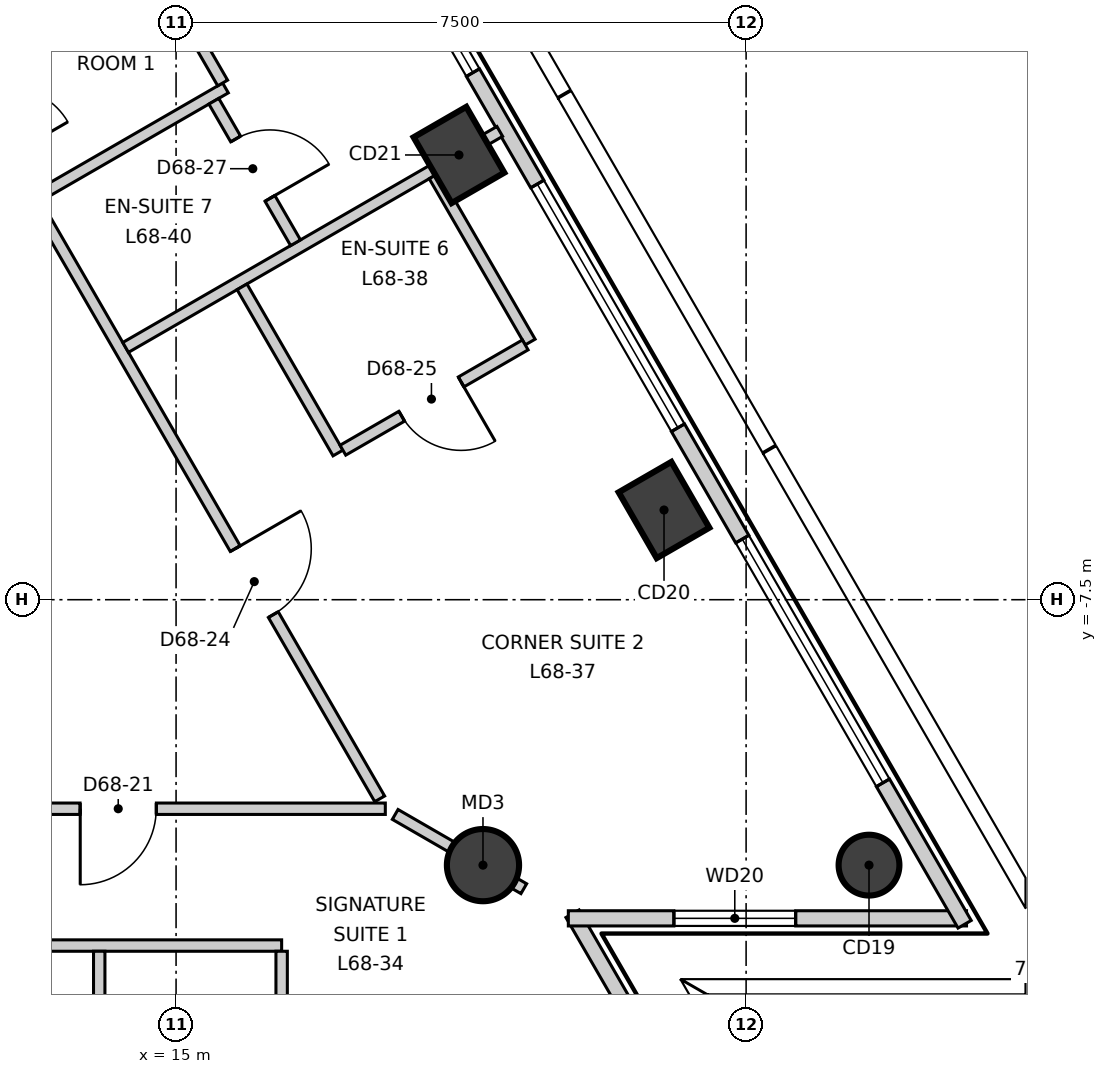
"""IFC4 building model, lengths in metres.
Left out: names, types, materials, properties, quantities, classifications, styles, units other than length and angle.
Written with IfcOpenShell. Run it as: python <this file> out.ifc"""

import sys

from ifc_helpers import new_model, si_unit, direction, frame, frame_2d, origin, origin_2d, place, context, subcontext, project, spatial, rectangle, circle, extrude, element, fill, save


model = new_model("IFC4")
c1 = context("Model", 3, precision=1e-05, world=origin(), true_north=direction((0.0, 1.0)))
c2 = subcontext(c1, "Body", "Model", "MODEL_VIEW")
j1 = project(units=[si_unit("LENGTHUNIT", "METRE"), si_unit("PLANEANGLEUNIT", "RADIAN")], contexts=[c1])
p1 = place(None, origin())
s1 = spatial("IfcSite", under=j1, at=p1, CompositionType="ELEMENT")
p2 = place(p1, origin())
s2 = spatial("IfcBuilding", under=s1, at=p2, CompositionType="ELEMENT")
p3 = place(p2, frame((0.0, 0.0, 289.9)))
s3 = spatial("IfcBuildingStorey", under=s2, at=p3, CompositionType="ELEMENT", Elevation=289.9)
p4 = place(p3, frame((24.117, -10.992, -0.3), z_axis=(0.0, 0.0, 1.0), x_axis=(-0.5, 0.866025403784, 0.0)))
e1 = element("IfcColumn", 1, at=p4, inside=s3, PredefinedType="COLUMN", context=c2, shape_type="SweptSolid", body=[
    extrude(circle(Radius=0.4, at=origin_2d()), origin(), (0.0, 0.0, 1.0), 3.6),
])
for number, where, z_axis, x_axis in (
    (2, (21.42, -6.32, -0.3), (0.0, 0.0, 1.0), (-0.5, 0.866, 0.0)),
    (3, (18.722, -1.649, -0.3), (0.0, 0.0, 1.0), (-0.5, 0.866, 0.0)),
):
    element("IfcColumn", number, at=place(p3, frame(where, z_axis=z_axis, x_axis=x_axis)), inside=s3, PredefinedType="COLUMN", context=c2, shape_type="SweptSolid", body=[
        extrude(rectangle(XDim=1.0, YDim=0.8, at=origin_2d()), origin(), (0.0, 0.0, 1.0), 3.6),
    ])
p5 = place(p3, frame((19.038, -10.992, -0.3), z_axis=(0.0, 0.0, 1.0), x_axis=(1.0, 0.0, 0.0)))
e4 = element("IfcColumn", 4, at=p5, inside=s3, PredefinedType="COLUMN", context=c2, shape_type="SweptSolid", body=[
    extrude(circle(Radius=0.475, at=origin_2d()), origin(), (0.0, 0.0, 1.0), 3.6),
])
p6 = place(p3, frame((22.835, -16.168, 0.0), z_axis=(0.0, 0.0, 1.0), x_axis=(-0.499933584342, 0.866063745487, 0.0)))
e5 = element("IfcWall", 5, at=p6, inside=s3, PredefinedType="ELEMENTEDWALL", context=c2, shape_type="SweptSolid", body=[
    extrude(rectangle(XDim=5.239, YDim=0.2, at=frame_2d((2.619, 0.0))), origin(), (0.0, 0.0, 1.0), 3.3),
])
p7 = place(p6, frame((1.99, 0.0, 0.9)))
e6 = element("IfcOpeningElement", 6, at=p7, cuts=e5, PredefinedType="OPENING", context=c2, shape_type="SweptSolid", body=[
    extrude(rectangle(XDim=1.6, YDim=2.2, at=frame_2d((0.8, 1.1))), frame((0.0, 0.11, 0.0), z_axis=(0.0, -1.0, 0.0), x_axis=(1.0, 0.0, 0.0)), (0.0, 0.0, 1.0), 0.22),
])
p8 = place(p3, frame((20.161, -11.692, 0.0), z_axis=(0.0, 0.0, 1.0), x_axis=(1.0, 0.0, 0.0)))
e7 = element("IfcWall", 7, at=p8, inside=s3, PredefinedType="ELEMENTEDWALL", context=c2, shape_type="SweptSolid", body=[
    extrude(rectangle(XDim=5.239, YDim=0.2, at=frame_2d((2.62, 0.0))), origin(), (0.0, 0.0, 1.0), 3.3),
])
p9 = place(p8, frame((1.39, 0.0, 0.9)))
e8 = element("IfcOpeningElement", 8, at=p9, cuts=e7, PredefinedType="OPENING", context=c2, shape_type="SweptSolid", body=[
    extrude(rectangle(XDim=1.6, YDim=2.2, at=frame_2d((0.8, 1.1))), frame((0.0, 0.11, 0.0), z_axis=(0.0, -1.0, 0.0), x_axis=(1.0, 0.0, 0.0)), (0.0, 0.0, 1.0), 0.22),
])
p10 = place(p3, frame((25.375, -11.77, 0.0), z_axis=(0.0, 0.0, 1.0), x_axis=(-0.500008134474, 0.866020707292, 0.0)))
e9 = element("IfcWall", 9, at=p10, inside=s3, PredefinedType="ELEMENTEDWALL", context=c2, shape_type="SweptSolid", body=[
    extrude(rectangle(XDim=45.741, YDim=0.2, at=frame_2d((22.871, 0.0))), origin(), (0.0, 0.0, 1.0), 3.3),
])
p11 = place(p10, frame((2.15, 0.0, 0.9)))
e10 = element("IfcOpeningElement", 10, at=p11, cuts=e9, PredefinedType="OPENING", context=c2, shape_type="SweptSolid", body=[
    extrude(rectangle(XDim=3.7, YDim=2.2, at=frame_2d((1.85, 1.1))), frame((0.0, 0.11, 0.0), z_axis=(0.0, -1.0, 0.0), x_axis=(1.0, 0.0, 0.0)), (0.0, 0.0, 1.0), 0.22),
])
p12 = place(p10, frame((7.544, 0.0, 0.9)))
e11 = element("IfcOpeningElement", 11, at=p12, cuts=e9, PredefinedType="OPENING", context=c2, shape_type="SweptSolid", body=[
    extrude(rectangle(XDim=3.7, YDim=2.2, at=frame_2d((1.85, 1.1))), frame((0.0, 0.11, 0.0), z_axis=(0.0, -1.0, 0.0), x_axis=(1.0, 0.0, 0.0)), (0.0, 0.0, 1.0), 0.22),
])
p13 = place(p10, frame((12.939, 0.0, 0.9)))
e12 = element("IfcOpeningElement", 12, at=p13, cuts=e9, PredefinedType="OPENING", context=c2, shape_type="SweptSolid", body=[
    extrude(rectangle(XDim=3.7, YDim=2.2, at=frame_2d((1.85, 1.1))), frame((0.0, 0.11, 0.0), z_axis=(0.0, -1.0, 0.0), x_axis=(1.0, 0.0, 0.0)), (0.0, 0.0, 1.0), 0.22),
])
p14 = place(p10, frame((18.333, 0.0, 0.9)))
e13 = element("IfcOpeningElement", 13, at=p14, cuts=e9, PredefinedType="OPENING", context=c2, shape_type="SweptSolid", body=[
    extrude(rectangle(XDim=3.7, YDim=2.2, at=frame_2d((1.85, 1.1))), frame((0.0, 0.11, 0.0), z_axis=(0.0, -1.0, 0.0), x_axis=(1.0, 0.0, 0.0)), (0.0, 0.0, 1.0), 0.22),
])
p15 = place(p10, frame((23.728, 0.0, 0.9)))
e14 = element("IfcOpeningElement", 14, at=p15, cuts=e9, PredefinedType="OPENING", context=c2, shape_type="SweptSolid", body=[
    extrude(rectangle(XDim=3.7, YDim=2.2, at=frame_2d((1.85, 1.1))), frame((0.0, 0.11, 0.0), z_axis=(0.0, -1.0, 0.0), x_axis=(1.0, 0.0, 0.0)), (0.0, 0.0, 1.0), 0.22),
])
p16 = place(p10, frame((29.122, 0.0, 0.9)))
e15 = element("IfcOpeningElement", 15, at=p16, cuts=e9, PredefinedType="OPENING", context=c2, shape_type="SweptSolid", body=[
    extrude(rectangle(XDim=3.7, YDim=2.2, at=frame_2d((1.85, 1.1))), frame((0.0, 0.11, 0.0), z_axis=(0.0, -1.0, 0.0), x_axis=(1.0, 0.0, 0.0)), (0.0, 0.0, 1.0), 0.22),
])
p17 = place(p10, frame((34.517, 0.0, 0.9)))
e16 = element("IfcOpeningElement", 16, at=p17, cuts=e9, PredefinedType="OPENING", context=c2, shape_type="SweptSolid", body=[
    extrude(rectangle(XDim=3.7, YDim=2.2, at=frame_2d((1.85, 1.1))), frame((0.0, 0.11, 0.0), z_axis=(0.0, -1.0, 0.0), x_axis=(1.0, 0.0, 0.0)), (0.0, 0.0, 1.0), 0.22),
])
p18 = place(p10, frame((39.911, 0.0, 0.9)))
e17 = element("IfcOpeningElement", 17, at=p18, cuts=e9, PredefinedType="OPENING", context=c2, shape_type="SweptSolid", body=[
    extrude(rectangle(XDim=3.7, YDim=2.2, at=frame_2d((1.85, 1.1))), frame((0.0, 0.11, 0.0), z_axis=(0.0, -1.0, 0.0), x_axis=(1.0, 0.0, 0.0)), (0.0, 0.0, 1.0), 0.22),
])
p19 = place(p3, frame((-17.603, -10.25, 0.0), z_axis=(0.0, 0.0, 1.0), x_axis=(1.0, 0.0, 0.0)))
e18 = element("IfcWall", 18, at=p19, inside=s3, PredefinedType="PARTITIONING", context=c2, shape_type="SweptSolid", body=[
    extrude(rectangle(XDim=35.356, YDim=0.15, at=frame_2d((17.678, 0.0))), origin(), (0.0, 0.0, 1.0), 3.3),
])
p20 = place(p19, frame((2.8, 0.0, 0.0)))
e19 = element("IfcOpeningElement", 19, at=p20, cuts=e18, PredefinedType="OPENING", context=c2, shape_type="SweptSolid", body=[
    extrude(rectangle(XDim=1.0, YDim=2.1, at=frame_2d((0.5, 1.05))), frame((0.0, 0.085, 0.0), z_axis=(0.0, -1.0, 0.0), x_axis=(1.0, 0.0, 0.0)), (0.0, 0.0, 1.0), 0.17),
])
p21 = place(p19, frame((15.065, 0.0, 0.0)))
e20 = element("IfcOpeningElement", 20, at=p21, cuts=e18, PredefinedType="OPENING", context=c2, shape_type="SweptSolid", body=[
    extrude(rectangle(XDim=1.0, YDim=2.1, at=frame_2d((0.5, 1.05))), frame((0.0, 0.085, 0.0), z_axis=(0.0, -1.0, 0.0), x_axis=(1.0, 0.0, 0.0)), (0.0, 0.0, 1.0), 0.17),
])
p22 = place(p19, frame((9.765, 0.0, 0.0)))
e21 = element("IfcOpeningElement", 21, at=p22, cuts=e18, PredefinedType="OPENING", context=c2, shape_type="SweptSolid", body=[
    extrude(rectangle(XDim=0.9, YDim=2.1, at=frame_2d((0.45, 1.05))), frame((0.0, 0.085, 0.0), z_axis=(0.0, -1.0, 0.0), x_axis=(1.0, 0.0, 0.0)), (0.0, 0.0, 1.0), 0.17),
])
p23 = place(p19, frame((11.965, 0.0, 0.0)))
e22 = element("IfcOpeningElement", 22, at=p23, cuts=e18, PredefinedType="OPENING", context=c2, shape_type="SweptSolid", body=[
    extrude(rectangle(XDim=0.9, YDim=2.1, at=frame_2d((0.45, 1.05))), frame((0.0, 0.085, 0.0), z_axis=(0.0, -1.0, 0.0), x_axis=(1.0, 0.0, 0.0)), (0.0, 0.0, 1.0), 0.17),
])
p24 = place(p19, frame((20.953, 0.0, 0.0)))
e23 = element("IfcOpeningElement", 23, at=p24, cuts=e18, PredefinedType="OPENING", context=c2, shape_type="SweptSolid", body=[
    extrude(rectangle(XDim=1.0, YDim=2.1, at=frame_2d((0.5, 1.05))), frame((0.0, 0.085, 0.0), z_axis=(0.0, -1.0, 0.0), x_axis=(1.0, 0.0, 0.0)), (0.0, 0.0, 1.0), 0.17),
])
p25 = place(p19, frame((26.347, 0.0, 0.0)))
e24 = element("IfcOpeningElement", 24, at=p25, cuts=e18, PredefinedType="OPENING", context=c2, shape_type="SweptSolid", body=[
    extrude(rectangle(XDim=1.0, YDim=2.1, at=frame_2d((0.5, 1.05))), frame((0.0, 0.085, 0.0), z_axis=(0.0, -1.0, 0.0), x_axis=(1.0, 0.0, 0.0)), (0.0, 0.0, 1.0), 0.17),
])
p26 = place(p19, frame((31.342, 0.0, 0.0)))
e25 = element("IfcOpeningElement", 25, at=p26, cuts=e18, PredefinedType="OPENING", context=c2, shape_type="SweptSolid", body=[
    extrude(rectangle(XDim=1.0, YDim=2.1, at=frame_2d((0.5, 1.05))), frame((0.0, 0.085, 0.0), z_axis=(0.0, -1.0, 0.0), x_axis=(1.0, 0.0, 0.0)), (0.0, 0.0, 1.0), 0.17),
])
p27 = place(p3, frame((17.883, -10.325, 0.0), z_axis=(0.0, 0.0, 1.0), x_axis=(0.865973311606, -0.500090215447, 0.0)))
e26 = element("IfcWall", 26, at=p27, inside=s3, PredefinedType="PARTITIONING", context=c2, shape_type="SweptSolid", body=[
    extrude(rectangle(XDim=1.954, YDim=0.15, at=frame_2d((0.977, 0.0))), origin(), (0.0, 0.0, 1.0), 2.8),
])
p28 = place(p3, frame((0.075, 20.37, 0.0), z_axis=(0.0, 0.0, 1.0), x_axis=(0.500009775255, -0.866019759965, 0.0)))
e27 = element("IfcWall", 27, at=p28, inside=s3, PredefinedType="PARTITIONING", context=c2, shape_type="SweptSolid", body=[
    extrude(rectangle(XDim=35.207, YDim=0.15, at=frame_2d((17.604, 0.0))), origin(), (0.0, 0.0, 1.0), 3.3),
])
p29 = place(p28, frame((31.407, 0.0, 0.0)))
e28 = element("IfcOpeningElement", 28, at=p29, cuts=e27, PredefinedType="OPENING", context=c2, shape_type="SweptSolid", body=[
    extrude(rectangle(XDim=1.0, YDim=2.1, at=frame_2d((0.5, 1.05))), frame((0.0, 0.085, 0.0), z_axis=(0.0, -1.0, 0.0), x_axis=(1.0, 0.0, 0.0)), (0.0, 0.0, 1.0), 0.17),
])
p30 = place(p28, frame((19.243, 0.0, 0.0)))
e29 = element("IfcOpeningElement", 29, at=p30, cuts=e27, PredefinedType="OPENING", context=c2, shape_type="SweptSolid", body=[
    extrude(rectangle(XDim=1.0, YDim=2.1, at=frame_2d((0.5, 1.05))), frame((0.0, 0.085, 0.0), z_axis=(0.0, -1.0, 0.0), x_axis=(1.0, 0.0, 0.0)), (0.0, 0.0, 1.0), 0.17),
])
p31 = place(p28, frame((24.543, 0.0, 0.0)))
e30 = element("IfcOpeningElement", 30, at=p31, cuts=e27, PredefinedType="OPENING", context=c2, shape_type="SweptSolid", body=[
    extrude(rectangle(XDim=0.9, YDim=2.1, at=frame_2d((0.45, 1.05))), frame((0.0, 0.085, 0.0), z_axis=(0.0, -1.0, 0.0), x_axis=(1.0, 0.0, 0.0)), (0.0, 0.0, 1.0), 0.17),
])
p32 = place(p28, frame((22.443, 0.0, 0.0)))
e31 = element("IfcOpeningElement", 31, at=p32, cuts=e27, PredefinedType="OPENING", context=c2, shape_type="SweptSolid", body=[
    extrude(rectangle(XDim=0.9, YDim=2.1, at=frame_2d((0.45, 1.05))), frame((0.0, 0.085, 0.0), z_axis=(0.0, -1.0, 0.0), x_axis=(1.0, 0.0, 0.0)), (0.0, 0.0, 1.0), 0.17),
])
p33 = place(p28, frame((13.253, 0.0, 0.0)))
e32 = element("IfcOpeningElement", 32, at=p33, cuts=e27, PredefinedType="OPENING", context=c2, shape_type="SweptSolid", body=[
    extrude(rectangle(XDim=1.0, YDim=2.1, at=frame_2d((0.5, 1.05))), frame((0.0, 0.085, 0.0), z_axis=(0.0, -1.0, 0.0), x_axis=(1.0, 0.0, 0.0)), (0.0, 0.0, 1.0), 0.17),
])
p34 = place(p28, frame((5.559, 0.0, 0.0)))
e33 = element("IfcOpeningElement", 33, at=p34, cuts=e27, PredefinedType="OPENING", context=c2, shape_type="SweptSolid", body=[
    extrude(rectangle(XDim=1.0, YDim=2.1, at=frame_2d((0.5, 1.05))), frame((0.0, 0.085, 0.0), z_axis=(0.0, -1.0, 0.0), x_axis=(1.0, 0.0, 0.0)), (0.0, 0.0, 1.0), 0.17),
])
p35 = place(p3, frame((12.086, -0.284, 0.0), z_axis=(0.0, 0.0, 1.0), x_axis=(0.865995540999, 0.500051720295, 0.0)))
e34 = element("IfcWall", 34, at=p35, inside=s3, PredefinedType="PARTITIONING", context=c2, shape_type="SweptSolid", body=[
    extrude(rectangle(XDim=2.845, YDim=0.15, at=frame_2d((1.423, 0.0))), origin(), (0.0, 0.0, 1.0), 3.3),
])
p36 = place(p3, frame((13.186, -2.189, 0.0), z_axis=(0.0, 0.0, 1.0), x_axis=(0.866122712398, 0.499831418649, 0.0)))
e35 = element("IfcWall", 35, at=p36, inside=s3, PredefinedType="PARTITIONING", context=c2, shape_type="SweptSolid", body=[
    extrude(rectangle(XDim=2.845, YDim=0.15, at=frame_2d((1.422, 0.0))), origin(), (0.0, 0.0, 1.0), 3.3),
])
p37 = place(p3, frame((14.336, -4.181, 0.0), z_axis=(0.0, 0.0, 1.0), x_axis=(0.86606758311, 0.499926936147, 0.0)))
e36 = element("IfcWall", 36, at=p37, inside=s3, PredefinedType="PARTITIONING", context=c2, shape_type="SweptSolid", body=[
    extrude(rectangle(XDim=5.684, YDim=0.15, at=frame_2d((2.842, 0.0))), origin(), (0.0, 0.0, 1.0), 3.3),
])
p38 = place(p3, frame((14.588, 1.074, 0.0), z_axis=(0.0, 0.0, 1.0), x_axis=(0.499942325911, -0.866058699375, 0.0)))
e37 = element("IfcWall", 37, at=p38, inside=s3, PredefinedType="PARTITIONING", context=c2, shape_type="SweptSolid", body=[
    extrude(rectangle(XDim=2.051, YDim=0.15, at=frame_2d((1.025, 0.0))), origin(), (0.0, 0.0, 1.0), 3.3),
])
p39 = place(p3, frame((10.864, -12.05, 0.0), z_axis=(0.0, 0.0, 1.0), x_axis=(1.0, 0.0, 0.0)))
e38 = element("IfcWall", 38, at=p39, inside=s3, PredefinedType="PARTITIONING", context=c2, shape_type="SweptSolid", body=[
    extrude(rectangle(XDim=5.525, YDim=0.15, at=frame_2d((2.762, 0.0))), origin(), (0.0, 0.0, 1.0), 3.3),
])
p40 = place(p39, frame((1.075, 0.0, 0.0)))
e39 = element("IfcOpeningElement", 39, at=p40, cuts=e38, PredefinedType="OPENING", context=c2, shape_type="SweptSolid", body=[
    extrude(rectangle(XDim=0.9, YDim=2.1, at=frame_2d((0.45, 1.05))), frame((0.0, 0.085, 0.0), z_axis=(0.0, -1.0, 0.0), x_axis=(1.0, 0.0, 0.0)), (0.0, 0.0, 1.0), 0.17),
])
p41 = place(p3, frame((15.497, -0.942, 0.0), z_axis=(0.0, 0.0, 1.0), x_axis=(0.499961633463, -0.866047553582, 0.0)))
e40 = element("IfcWall", 40, at=p41, inside=s3, PredefinedType="PARTITIONING", context=c2, shape_type="SweptSolid", body=[
    extrude(rectangle(XDim=2.15, YDim=0.15, at=frame_2d((1.075, 0.0))), origin(), (0.0, 0.0, 1.0), 3.3),
])
p42 = place(p41, frame((0.575, 0.0, 0.0)))
e41 = element("IfcOpeningElement", 41, at=p42, cuts=e40, PredefinedType="OPENING", context=c2, shape_type="SweptSolid", body=[
    extrude(rectangle(XDim=0.9, YDim=2.1, at=frame_2d((0.45, 1.05))), frame((0.0, 0.085, 0.0), z_axis=(0.0, -1.0, 0.0), x_axis=(1.0, 0.0, 0.0)), (0.0, 0.0, 1.0), 0.17),
])
p43 = place(p3, frame((18.396, -1.924, 0.0), z_axis=(0.0, 0.0, 1.0), x_axis=(0.500246986138, -0.865882759304, 0.0)))
e42 = element("IfcWall", 42, at=p43, inside=s3, PredefinedType="PARTITIONING", context=c2, shape_type="SweptSolid", body=[
    extrude(rectangle(XDim=2.525, YDim=0.15, at=frame_2d((1.262, 0.0))), origin(), (0.0, 0.0, 1.0), 2.6),
])
p44 = place(p3, frame((15.868, -3.384, 0.0), z_axis=(0.0, 0.0, 1.0), x_axis=(0.499956887143, -0.866050293573, 0.0)))
e43 = element("IfcWall", 43, at=p44, inside=s3, PredefinedType="PARTITIONING", context=c2, shape_type="SweptSolid", body=[
    extrude(rectangle(XDim=2.524, YDim=0.15, at=frame_2d((1.262, 0.0))), origin(), (0.0, 0.0, 1.0), 3.3),
])
p45 = place(p3, frame((13.989, -14.895, 0.0), z_axis=(0.0, 0.0, 1.0), x_axis=(0.0, 1.0, 0.0)))
e44 = element("IfcWall", 44, at=p45, inside=s3, PredefinedType="PARTITIONING", context=c2, shape_type="SweptSolid", body=[
    extrude(rectangle(XDim=2.77, YDim=0.15, at=frame_2d((1.385, 0.0))), origin(), (0.0, 0.0, 1.0), 3.3),
])
p46 = place(p3, frame((16.389, -14.775, 0.0), z_axis=(0.0, 0.0, 1.0), x_axis=(0.0, 1.0, 0.0)))
e45 = element("IfcWall", 45, at=p46, inside=s3, PredefinedType="PARTITIONING", context=c2, shape_type="SweptSolid", body=[
    extrude(rectangle(XDim=2.65, YDim=0.15, at=frame_2d((1.325, 0.0))), origin(), (0.0, 0.0, 1.0), 3.3),
])
p47 = place(p46, frame((0.875, 0.0, 0.0)))
e46 = element("IfcOpeningElement", 46, at=p47, cuts=e45, PredefinedType="OPENING", context=c2, shape_type="SweptSolid", body=[
    extrude(rectangle(XDim=0.9, YDim=2.1, at=frame_2d((0.45, 1.05))), frame((0.0, 0.085, 0.0), z_axis=(0.0, -1.0, 0.0), x_axis=(1.0, 0.0, 0.0)), (0.0, 0.0, 1.0), 0.17),
])
p48 = place(p3, frame((17.195, -5.533, 0.0), z_axis=(0.0, 0.0, 1.0), x_axis=(0.866027073272, 0.499997108352, 0.0)))
e47 = element("IfcWall", 47, at=p48, inside=s3, PredefinedType="PARTITIONING", context=c2, shape_type="SweptSolid", body=[
    extrude(rectangle(XDim=2.77, YDim=0.15, at=frame_2d((1.385, 0.0))), origin(), (0.0, 0.0, 1.0), 3.3),
])
p49 = place(p48, frame((0.895, 0.0, 0.0)))
e48 = element("IfcOpeningElement", 48, at=p49, cuts=e47, PredefinedType="OPENING", context=c2, shape_type="SweptSolid", body=[
    extrude(rectangle(XDim=0.9, YDim=2.1, at=frame_2d((0.45, 1.05))), frame((0.0, 0.085, 0.0), z_axis=(0.0, -1.0, 0.0), x_axis=(1.0, 0.0, 0.0)), (0.0, 0.0, 1.0), 0.17),
])
p50 = place(p9, origin())
e49 = element("IfcWindow", 49, at=p50, inside=s3, PartitioningType="SINGLE_PANEL", PredefinedType="WINDOW", context=c2, shape_type="SweptSolid", body=[
    extrude(rectangle(XDim=1.6, YDim=2.2, at=frame_2d((0.8, 1.1))), frame((0.0, 0.03, 0.0), z_axis=(0.0, -1.0, 0.0), x_axis=(1.0, 0.0, 0.0)), (0.0, 0.0, 1.0), 0.06),
])
fill(e8, e49)
p51 = place(p11, origin())
e50 = element("IfcWindow", 50, at=p51, inside=s3, PartitioningType="SINGLE_PANEL", PredefinedType="WINDOW", context=c2, shape_type="SweptSolid", body=[
    extrude(rectangle(XDim=3.7, YDim=2.2, at=frame_2d((1.85, 1.1))), frame((0.0, 0.03, 0.0), z_axis=(0.0, -1.0, 0.0), x_axis=(1.0, 0.0, 0.0)), (0.0, 0.0, 1.0), 0.06),
])
fill(e10, e50)
p52 = place(p12, origin())
e51 = element("IfcWindow", 51, at=p52, inside=s3, PartitioningType="SINGLE_PANEL", PredefinedType="WINDOW", context=c2, shape_type="SweptSolid", body=[
    extrude(rectangle(XDim=3.7, YDim=2.2, at=frame_2d((1.85, 1.1))), frame((0.0, 0.03, 0.0), z_axis=(0.0, -1.0, 0.0), x_axis=(1.0, 0.0, 0.0)), (0.0, 0.0, 1.0), 0.06),
])
fill(e11, e51)
p53 = place(p13, origin())
e52 = element("IfcWindow", 52, at=p53, inside=s3, PartitioningType="SINGLE_PANEL", PredefinedType="WINDOW", context=c2, shape_type="SweptSolid", body=[
    extrude(rectangle(XDim=3.7, YDim=2.2, at=frame_2d((1.85, 1.1))), frame((0.0, 0.03, 0.0), z_axis=(0.0, -1.0, 0.0), x_axis=(1.0, 0.0, 0.0)), (0.0, 0.0, 1.0), 0.06),
])
fill(e12, e52)
p54 = place(p26, origin())
e53 = element("IfcDoor", 53, at=p54, inside=s3, OperationType="SINGLE_SWING_LEFT", PredefinedType="DOOR", context=c2, shape_type="SweptSolid", body=[
    extrude(rectangle(XDim=1.0, YDim=2.1, at=frame_2d((0.5, 1.05))), frame((0.0, 0.025, 0.0), z_axis=(0.0, -1.0, 0.0), x_axis=(1.0, 0.0, 0.0)), (0.0, 0.0, 1.0), 0.05),
])
fill(e25, e53)
p55 = place(p29, origin())
e54 = element("IfcDoor", 54, at=p55, inside=s3, OperationType="SINGLE_SWING_RIGHT", PredefinedType="DOOR", context=c2, shape_type="SweptSolid", body=[
    extrude(rectangle(XDim=1.0, YDim=2.1, at=frame_2d((0.5, 1.05))), frame((0.0, 0.025, 0.0), z_axis=(0.0, -1.0, 0.0), x_axis=(1.0, 0.0, 0.0)), (0.0, 0.0, 1.0), 0.05),
])
fill(e28, e54)
p56 = place(p49, origin())
e55 = element("IfcDoor", 55, at=p56, inside=s3, OperationType="SINGLE_SWING_RIGHT", PredefinedType="DOOR", context=c2, shape_type="SweptSolid", body=[
    extrude(rectangle(XDim=0.9, YDim=2.1, at=frame_2d((0.45, 1.05))), frame((0.0, 0.025, 0.0), z_axis=(0.0, -1.0, 0.0), x_axis=(1.0, 0.0, 0.0)), (0.0, 0.0, 1.0), 0.05),
])
fill(e48, e55)
p57 = place(p42, origin())
e56 = element("IfcDoor", 56, at=p57, inside=s3, OperationType="SINGLE_SWING_LEFT", PredefinedType="DOOR", context=c2, shape_type="SweptSolid", body=[
    extrude(rectangle(XDim=0.9, YDim=2.1, at=frame_2d((0.45, 1.05))), frame((0.0, 0.025, 0.0), z_axis=(0.0, -1.0, 0.0), x_axis=(1.0, 0.0, 0.0)), (0.0, 0.0, 1.0), 0.05),
])
fill(e41, e56)
save(model, sys.argv[1])
